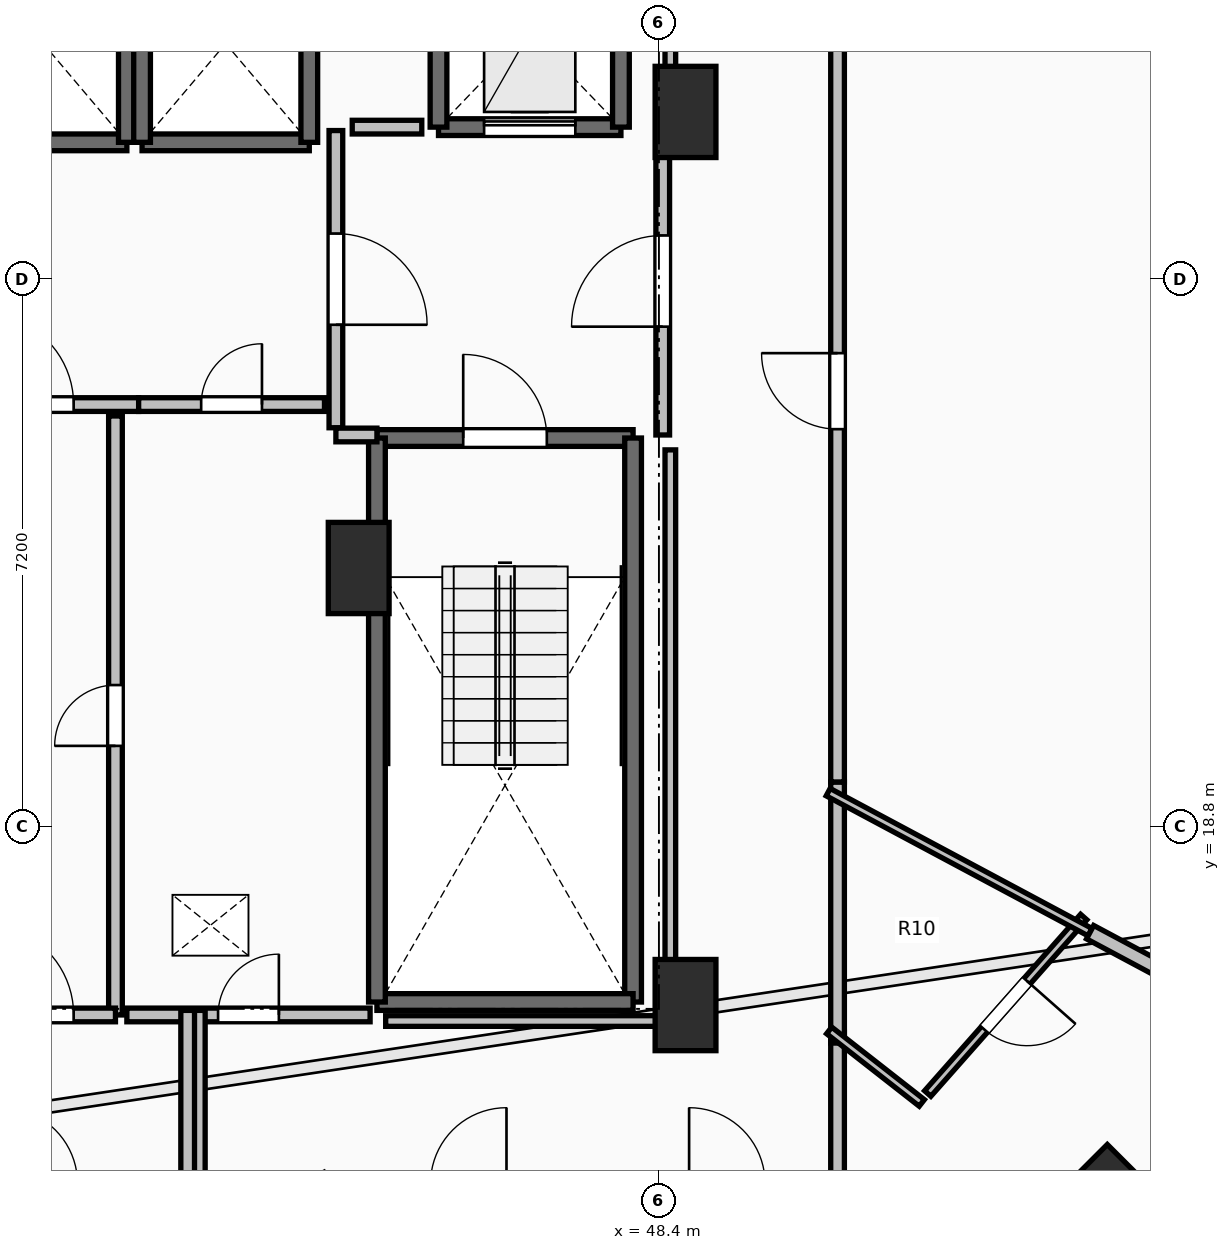
"""IFC4 building model, lengths in metres.
Left out: names, types, materials, properties, quantities, classifications, styles, units other than length and angle.
Written with IfcOpenShell. Run it as: python <this file> out.ifc"""

import sys

from ifc_helpers import new_model, si_unit, direction, frame, frame_2d, origin, origin_2d, place, context, subcontext, project, spatial, rectangle, extrude, element, fill, save


model = new_model("IFC4")
c1 = context("Model", 3, precision=1e-05, world=origin(), true_north=direction((0.0, 1.0)))
c2 = subcontext(c1, "Body", "Model", "MODEL_VIEW")
j1 = project(units=[si_unit("LENGTHUNIT", "METRE"), si_unit("PLANEANGLEUNIT", "RADIAN")], contexts=[c1])
p1 = place(None, origin())
s1 = spatial("IfcSite", under=j1, at=p1, CompositionType="ELEMENT")
p2 = place(p1, origin())
s2 = spatial("IfcBuilding", under=s1, at=p2, CompositionType="ELEMENT")
p3 = place(p2, frame((0.0, 0.0, 113.8)))
s3 = spatial("IfcBuildingStorey", under=s2, at=p3, CompositionType="ELEMENT", Elevation=113.8)
p4 = place(p3, frame((54.299, 13.838, 0.0), z_axis=(0.0, 0.0, 1.0), x_axis=(0.707106781187, -0.707106781187, 0.0)))
e1 = element("IfcColumn", 1, at=p4, inside=s3, PredefinedType="COLUMN", context=c2, shape_type="SweptSolid", body=[
    extrude(rectangle(XDim=1.1, YDim=1.1, at=origin_2d()), origin(), (0.0, 0.0, 1.0), 3.5),
])
for number, where, z_axis, x_axis in (
    (2, (48.75, 28.2, 0.0), (0.0, 0.0, 1.0), (1.0, 0.0, 0.0)),
    (3, (48.75, 16.45, 0.0), (0.0, 0.0, 1.0), (1.0, 0.0, 0.0)),
    (4, (44.45, 22.2, 0.0), (0.0, 0.0, 1.0), (1.0, 0.0, 0.0)),
):
    element("IfcColumn", number, at=place(p3, frame(where, z_axis=z_axis, x_axis=x_axis)), inside=s3, PredefinedType="PILASTER", context=c2, shape_type="SweptSolid", body=[
        extrude(rectangle(XDim=0.8, YDim=1.2, at=origin_2d()), origin(), (0.0, 0.0, 1.0), 3.5),
    ])
p5 = place(p3, frame((44.69, 23.91, 0.0), z_axis=(0.0, 0.0, 1.0), x_axis=(1.0, 0.0, 0.0)))
e5 = element("IfcWall", 5, at=p5, inside=s3, PredefinedType="SOLIDWALL", context=c2, shape_type="SweptSolid", body=[
    extrude(rectangle(XDim=3.37, YDim=0.22, at=frame_2d((1.685, 0.0))), origin(), (0.0, 0.0, 1.0), 3.24),
])
p6 = place(p5, frame((1.135, 0.0, 0.0)))
e6 = element("IfcOpeningElement", 6, at=p6, cuts=e5, PredefinedType="OPENING", context=c2, shape_type="SweptSolid", body=[
    extrude(rectangle(XDim=1.1, YDim=2.15, at=frame_2d((0.55, 1.075))), frame((0.0, 0.125, 0.0), z_axis=(0.0, -1.0, 0.0), x_axis=(1.0, 0.0, 0.0)), (0.0, 0.0, 1.0), 0.25),
])
p7 = place(p3, frame((48.06, 23.91, 0.0), z_axis=(0.0, 0.0, 1.0), x_axis=(0.0, -1.0, 0.0)))
e7 = element("IfcWall", 7, at=p7, inside=s3, PredefinedType="SOLIDWALL", context=c2, shape_type="SweptSolid", body=[
    extrude(rectangle(XDim=7.42, YDim=0.22, at=frame_2d((3.71, 0.0))), origin(), (0.0, 0.0, 1.0), 3.24),
])
p8 = place(p3, frame((48.06, 16.49, 0.0), z_axis=(0.0, 0.0, 1.0), x_axis=(-1.0, 0.0, 0.0)))
e8 = element("IfcWall", 8, at=p8, inside=s3, PredefinedType="SOLIDWALL", context=c2, shape_type="SweptSolid", body=[
    extrude(rectangle(XDim=3.37, YDim=0.22, at=frame_2d((1.685, 0.0))), origin(), (0.0, 0.0, 1.0), 3.24),
])
p9 = place(p3, frame((44.69, 16.49, 0.0), z_axis=(0.0, 0.0, 1.0), x_axis=(0.0, 1.0, 0.0)))
e9 = element("IfcWall", 9, at=p9, inside=s3, PredefinedType="SOLIDWALL", context=c2, shape_type="SweptSolid", body=[
    extrude(rectangle(XDim=7.42, YDim=0.22, at=frame_2d((3.71, 0.0))), origin(), (0.0, 0.0, 1.0), 3.24),
])
p10 = place(p3, frame((39.2, 27.8, 0.0), z_axis=(0.0, 0.0, 1.0), x_axis=(1.0, 0.0, 0.0)))
e10 = element("IfcWall", 10, at=p10, inside=s3, PredefinedType="SOLIDWALL", context=c2, shape_type="SweptSolid", body=[
    extrude(rectangle(XDim=2.2, YDim=0.22, at=frame_2d((1.1, 0.0))), origin(), (0.0, 0.0, 1.0), 3.24),
])
p11 = place(p3, frame((41.4, 27.8, 0.0), z_axis=(0.0, 0.0, 1.0), x_axis=(0.0, 1.0, 0.0)))
e11 = element("IfcWall", 11, at=p11, inside=s3, PredefinedType="SOLIDWALL", context=c2, shape_type="SweptSolid", body=[
    extrude(rectangle(XDim=2.6, YDim=0.22, at=frame_2d((1.3, 0.0))), origin(), (0.0, 0.0, 1.0), 3.24),
])
p12 = place(p3, frame((41.6, 27.8, 0.0), z_axis=(0.0, 0.0, 1.0), x_axis=(1.0, 0.0, 0.0)))
e12 = element("IfcWall", 12, at=p12, inside=s3, PredefinedType="SOLIDWALL", context=c2, shape_type="SweptSolid", body=[
    extrude(rectangle(XDim=2.2, YDim=0.22, at=frame_2d((1.1, 0.0))), origin(), (0.0, 0.0, 1.0), 3.24),
])
for number, where, z_axis, x_axis in (
    (13, (43.8, 27.8, 0.0), (0.0, 0.0, 1.0), (0.0, 1.0, 0.0)),
    (14, (41.6, 30.4, 0.0), (0.0, 0.0, 1.0), (0.0, -1.0, 0.0)),
):
    element("IfcWall", number, at=place(p3, frame(where, z_axis=z_axis, x_axis=x_axis)), inside=s3, PredefinedType="SOLIDWALL", context=c2, shape_type="SweptSolid", body=[
        extrude(rectangle(XDim=2.6, YDim=0.22, at=frame_2d((1.3, 0.0))), origin(), (0.0, 0.0, 1.0), 3.24),
    ])
p13 = place(p3, frame((45.5, 28.0, 0.0), z_axis=(0.0, 0.0, 1.0), x_axis=(1.0, 0.0, 0.0)))
e15 = element("IfcWall", 15, at=p13, inside=s3, PredefinedType="SHEAR", context=c2, shape_type="SweptSolid", body=[
    extrude(rectangle(XDim=2.4, YDim=0.22, at=frame_2d((1.2, 0.0))), origin(), (0.0, 0.0, 1.0), 3.24),
])
p14 = place(p13, frame((0.6, 0.0, 0.0)))
e16 = element("IfcOpeningElement", 16, at=p14, cuts=e15, PredefinedType="OPENING", context=c2, shape_type="SweptSolid", body=[
    extrude(rectangle(XDim=1.2, YDim=2.2, at=frame_2d((0.6, 1.1))), frame((0.0, 0.125, 0.0), z_axis=(0.0, -1.0, 0.0), x_axis=(1.0, 0.0, 0.0)), (0.0, 0.0, 1.0), 0.25),
])
for number, where, z_axis, x_axis in (
    (17, (47.9, 28.0, 0.0), (0.0, 0.0, 1.0), (0.0, 1.0, 0.0)),
    (18, (45.5, 30.5, 0.0), (0.0, 0.0, 1.0), (0.0, -1.0, 0.0)),
):
    element("IfcWall", number, at=place(p3, frame(where, z_axis=z_axis, x_axis=x_axis)), inside=s3, PredefinedType="SHEAR", context=c2, shape_type="SweptSolid", body=[
        extrude(rectangle(XDim=2.5, YDim=0.22, at=frame_2d((1.25, 0.0))), origin(), (0.0, 0.0, 1.0), 3.24),
    ])
p15 = place(p3, frame((44.15, 27.955, 0.0), z_axis=(0.0, 0.0, 1.0), x_axis=(0.0, -1.0, 0.0)))
e19 = element("IfcWall", 19, at=p15, inside=s3, PredefinedType="PARTITIONING", context=c2, shape_type="SweptSolid", body=[
    extrude(rectangle(XDim=3.91, YDim=0.18, at=frame_2d((1.955, 0.0))), origin(), (0.0, 0.0, 1.0), 3.24),
])
p16 = place(p15, frame((1.355, 0.0, 0.0)))
e20 = element("IfcOpeningElement", 20, at=p16, cuts=e19, PredefinedType="OPENING", context=c2, shape_type="SweptSolid", body=[
    extrude(rectangle(XDim=1.2, YDim=2.15, at=frame_2d((0.6, 1.075))), frame((0.0, 0.105, 0.0), z_axis=(0.0, -1.0, 0.0), x_axis=(1.0, 0.0, 0.0)), (0.0, 0.0, 1.0), 0.21),
])
p17 = place(p3, frame((44.15, 23.95, 0.0), z_axis=(0.0, 0.0, 1.0), x_axis=(1.0, 0.0, 0.0)))
e21 = element("IfcWall", 21, at=p17, inside=s3, PredefinedType="PARTITIONING", context=c2, shape_type="SweptSolid", body=[
    extrude(rectangle(XDim=0.54, YDim=0.18, at=frame_2d((0.27, 0.0))), origin(), (0.0, 0.0, 1.0), 3.24),
])
p18 = place(p3, frame((48.45, 23.95, 0.0), z_axis=(0.0, 0.0, 1.0), x_axis=(0.0, 1.0, 0.0)))
e22 = element("IfcWall", 22, at=p18, inside=s3, PredefinedType="PARTITIONING", context=c2, shape_type="SweptSolid", body=[
    extrude(rectangle(XDim=4.05, YDim=0.18, at=frame_2d((2.025, 0.0))), origin(), (0.0, 0.0, 1.0), 3.24),
])
p19 = place(p18, frame((1.425, 0.0, 0.0)))
e23 = element("IfcOpeningElement", 23, at=p19, cuts=e22, PredefinedType="OPENING", context=c2, shape_type="SweptSolid", body=[
    extrude(rectangle(XDim=1.2, YDim=2.15, at=frame_2d((0.6, 1.075))), frame((0.0, 0.105, 0.0), z_axis=(0.0, -1.0, 0.0), x_axis=(1.0, 0.0, 0.0)), (0.0, 0.0, 1.0), 0.21),
])
p20 = place(p3, frame((38.645, 24.35, 0.0), z_axis=(0.0, 0.0, 1.0), x_axis=(1.0, 0.0, 0.0)))
e24 = element("IfcWall", 24, at=p20, inside=s3, PredefinedType="PARTITIONING", context=c2, shape_type="SweptSolid", body=[
    extrude(rectangle(XDim=2.91, YDim=0.18, at=frame_2d((1.455, 0.0))), origin(), (0.0, 0.0, 1.0), 3.24),
])
p21 = place(p20, frame((0.855, 0.0, 0.0)))
e25 = element("IfcOpeningElement", 25, at=p21, cuts=e24, PredefinedType="OPENING", context=c2, shape_type="SweptSolid", body=[
    extrude(rectangle(XDim=1.2, YDim=2.15, at=frame_2d((0.6, 1.075))), frame((0.0, 0.105, 0.0), z_axis=(0.0, -1.0, 0.0), x_axis=(1.0, 0.0, 0.0)), (0.0, 0.0, 1.0), 0.21),
])
p22 = place(p3, frame((41.555, 24.35, 0.0), z_axis=(0.0, 0.0, 1.0), x_axis=(1.0, 0.0, 0.0)))
e26 = element("IfcWall", 26, at=p22, inside=s3, PredefinedType="PARTITIONING", context=c2, shape_type="SweptSolid", body=[
    extrude(rectangle(XDim=2.445, YDim=0.18, at=frame_2d((1.223, 0.0))), origin(), (0.0, 0.0, 1.0), 3.24),
])
p23 = place(p22, frame((0.823, 0.0, 0.0)))
e27 = element("IfcOpeningElement", 27, at=p23, cuts=e26, PredefinedType="OPENING", context=c2, shape_type="SweptSolid", body=[
    extrude(rectangle(XDim=0.8, YDim=2.05, at=frame_2d((0.4, 1.025))), frame((0.0, 0.105, 0.0), z_axis=(0.0, -1.0, 0.0), x_axis=(1.0, 0.0, 0.0)), (0.0, 0.0, 1.0), 0.21),
])
p24 = place(p3, frame((41.25, 16.32, 0.0), z_axis=(0.0, 0.0, 1.0), x_axis=(0.0, 1.0, 0.0)))
e28 = element("IfcWall", 28, at=p24, inside=s3, PredefinedType="PARTITIONING", context=c2, shape_type="SweptSolid", body=[
    extrude(rectangle(XDim=7.88, YDim=0.18, at=frame_2d((3.94, 0.0))), origin(), (0.0, 0.0, 1.0), 3.24),
])
p25 = place(p24, frame((3.54, 0.0, 0.0)))
e29 = element("IfcOpeningElement", 29, at=p25, cuts=e28, PredefinedType="OPENING", context=c2, shape_type="SweptSolid", body=[
    extrude(rectangle(XDim=0.8, YDim=2.05, at=frame_2d((0.4, 1.025))), frame((0.0, 0.105, 0.0), z_axis=(0.0, -1.0, 0.0), x_axis=(1.0, 0.0, 0.0)), (0.0, 0.0, 1.0), 0.21),
])
p26 = place(p3, frame((38.95, 16.32, 0.0), z_axis=(0.0, 0.0, 1.0), x_axis=(1.0, 0.0, 0.0)))
e30 = element("IfcWall", 30, at=p26, inside=s3, PredefinedType="PARTITIONING", context=c2, shape_type="SweptSolid", body=[
    extrude(rectangle(XDim=2.3, YDim=0.18, at=frame_2d((1.15, 0.0))), origin(), (0.0, 0.0, 1.0), 3.24),
])
p27 = place(p26, frame((0.55, 0.0, 0.0)))
e31 = element("IfcOpeningElement", 31, at=p27, cuts=e30, PredefinedType="OPENING", context=c2, shape_type="SweptSolid", body=[
    extrude(rectangle(XDim=1.2, YDim=2.15, at=frame_2d((0.6, 1.075))), frame((0.0, 0.105, 0.0), z_axis=(0.0, -1.0, 0.0), x_axis=(1.0, 0.0, 0.0)), (0.0, 0.0, 1.0), 0.21),
])
p28 = place(p3, frame((41.4, 16.32, 0.0), z_axis=(0.0, 0.0, 1.0), x_axis=(1.0, 0.0, 0.0)))
e32 = element("IfcWall", 32, at=p28, inside=s3, PredefinedType="PARTITIONING", context=c2, shape_type="SweptSolid", body=[
    extrude(rectangle(XDim=3.2, YDim=0.18, at=frame_2d((1.6, 0.0))), origin(), (0.0, 0.0, 1.0), 3.24),
])
p29 = place(p28, frame((1.2, 0.0, 0.0)))
e33 = element("IfcOpeningElement", 33, at=p29, cuts=e32, PredefinedType="OPENING", context=c2, shape_type="SweptSolid", body=[
    extrude(rectangle(XDim=0.8, YDim=2.05, at=frame_2d((0.4, 1.025))), frame((0.0, 0.105, 0.0), z_axis=(0.0, -1.0, 0.0), x_axis=(1.0, 0.0, 0.0)), (0.0, 0.0, 1.0), 0.21),
])
for number, where, z_axis, x_axis in (
    (34, (42.34, 16.38, 0.0), (0.0, 0.0, 1.0), (0.0, -1.0, 0.0)),
    (35, (42.2, 13.96, 0.0), (0.0, 0.0, 1.0), (0.0, 1.0, 0.0)),
):
    element("IfcWall", number, at=place(p3, frame(where, z_axis=z_axis, x_axis=x_axis)), inside=s3, PredefinedType="PARTITIONING", context=c2, shape_type="SweptSolid", body=[
        extrude(rectangle(XDim=2.42, YDim=0.18, at=frame_2d((1.21, 0.0))), origin(), (0.0, 0.0, 1.0), 2.929),
    ])
p30 = place(p3, frame((50.75, 14.1, 0.0), z_axis=(0.0, 0.0, 1.0), x_axis=(0.0, 1.0, 0.0)))
e36 = element("IfcWall", 36, at=p30, inside=s3, PredefinedType="PARTITIONING", context=c2, shape_type="SweptSolid", body=[
    extrude(rectangle(XDim=1.99, YDim=0.18, at=frame_2d((0.995, 0.0))), origin(), (0.0, 0.0, 1.0), 2.432),
])
p31 = place(p3, frame((50.75, 15.95, 0.0), z_axis=(0.0, 0.0, 1.0), x_axis=(0.0, 1.0, 0.0)))
e37 = element("IfcWall", 37, at=p31, inside=s3, PredefinedType="PARTITIONING", context=c2, shape_type="SweptSolid", body=[
    extrude(rectangle(XDim=3.435, YDim=0.18, at=frame_2d((1.718, 0.0))), origin(), (0.0, 0.0, 1.0), 2.929),
])
p32 = place(p3, frame((50.75, 19.385, 0.0), z_axis=(0.0, 0.0, 1.0), x_axis=(0.0, 1.0, 0.0)))
e38 = element("IfcWall", 38, at=p32, inside=s3, PredefinedType="PARTITIONING", context=c2, shape_type="SweptSolid", body=[
    extrude(rectangle(XDim=10.283, YDim=0.18, at=frame_2d((5.142, 0.0))), origin(), (0.0, 0.0, 1.0), 2.432),
])
p33 = place(p32, frame((4.642, 0.0, 0.0)))
e39 = element("IfcOpeningElement", 39, at=p33, cuts=e38, PredefinedType="OPENING", context=c2, shape_type="SweptSolid", body=[
    extrude(rectangle(XDim=1.0, YDim=2.15, at=frame_2d((0.5, 1.075))), frame((0.0, 0.105, 0.0), z_axis=(0.0, -1.0, 0.0), x_axis=(1.0, 0.0, 0.0)), (0.0, 0.0, 1.0), 0.21),
])
p34 = place(p3, frame((53.989, 17.608, 0.0), z_axis=(0.0, 0.0, 1.0), x_axis=(-0.662322264705, -0.749219071885, 0.0)))
e40 = element("IfcWall", 40, at=p34, inside=s3, PredefinedType="PARTITIONING", context=c2, shape_type="SweptSolid", body=[
    extrude(rectangle(XDim=3.099, YDim=0.11, at=frame_2d((1.549, 0.0))), origin(), (0.0, 0.0, 1.0), 2.886),
])
p35 = place(p34, frame((1.125, 0.0, 0.0)))
e41 = element("IfcOpeningElement", 41, at=p35, cuts=e40, PredefinedType="OPENING", context=c2, shape_type="SweptSolid", body=[
    extrude(rectangle(XDim=0.85, YDim=2.1, at=frame_2d((0.425, 1.05))), frame((0.0, 0.07, 0.0), z_axis=(0.0, -1.0, 0.0), x_axis=(1.0, 0.0, 0.0)), (0.0, 0.0, 1.0), 0.14),
])
p36 = place(p3, frame((51.858, 15.163, 0.0), z_axis=(0.0, 0.0, 1.0), x_axis=(-0.787564922247, 0.61623168796, 0.0)))
e42 = element("IfcWall", 42, at=p36, inside=s3, PredefinedType="PARTITIONING", context=c2, shape_type="SweptSolid", body=[
    extrude(rectangle(XDim=1.548, YDim=0.11, at=frame_2d((0.774, 0.0))), origin(), (0.0, 0.0, 1.0), 2.432),
])
p37 = place(p3, frame((54.073, 17.409, 0.0), z_axis=(0.0, 0.0, 1.0), x_axis=(-0.881911515214, 0.47141497572, 0.0)))
e43 = element("IfcWall", 43, at=p37, inside=s3, PredefinedType="PARTITIONING", context=c2, shape_type="SweptSolid", body=[
    extrude(rectangle(XDim=3.907, YDim=0.11, at=frame_2d((1.954, 0.0))), origin(), (0.0, 0.0, 1.0), 2.886),
])
p38 = place(p3, frame((59.384, 14.57, 0.0), z_axis=(0.0, 0.0, 1.0), x_axis=(-0.881918302895, 0.471402277274, 0.0)))
e44 = element("IfcWall", 44, at=p38, inside=s3, PredefinedType="PARTITIONING", context=c2, shape_type="SweptSolid", body=[
    extrude(rectangle(XDim=6.023, YDim=0.2, at=frame_2d((3.011, 0.0))), origin(), (0.0, 0.0, 1.0), 2.677),
])
p39 = place(p3, frame((45.28, 28.0, 0.0), z_axis=(0.0, 0.0, 1.0), x_axis=(-1.0, 0.0, 0.0)))
e45 = element("IfcWall", 45, at=p39, inside=s3, PredefinedType="PARTITIONING", context=c2, shape_type="SweptSolid", body=[
    extrude(rectangle(XDim=0.915, YDim=0.18, at=frame_2d((0.458, 0.0))), origin(), (0.0, 0.0, 1.0), 3.24),
])
p40 = place(p3, frame((48.55, 33.45, 0.0), z_axis=(0.0, 0.0, 1.0), x_axis=(0.0, -1.0, 0.0)))
e46 = element("IfcWall", 46, at=p40, inside=s3, PredefinedType="PARTITIONING", context=c2, shape_type="SweptSolid", body=[
    extrude(rectangle(XDim=5.254, YDim=0.14, at=frame_2d((2.627, 0.0))), origin(), (0.0, 0.0, 1.0), 2.432),
])
p41 = place(p3, frame((48.55, 23.754, 0.0), z_axis=(0.0, 0.0, 1.0), x_axis=(0.0, -1.0, 0.0)))
e47 = element("IfcWall", 47, at=p41, inside=s3, PredefinedType="PARTITIONING", context=c2, shape_type="SweptSolid", body=[
    extrude(rectangle(XDim=7.514, YDim=0.14, at=frame_2d((3.757, 0.0))), origin(), (0.0, 0.0, 1.0), 2.432),
])
p42 = place(p3, frame((48.55, 16.24, 0.0), z_axis=(0.0, 0.0, 1.0), x_axis=(-1.0, 0.0, 0.0)))
e48 = element("IfcWall", 48, at=p42, inside=s3, PredefinedType="PARTITIONING", context=c2, shape_type="SweptSolid", body=[
    extrude(rectangle(XDim=3.745, YDim=0.14, at=frame_2d((1.873, 0.0))), origin(), (0.0, 0.0, 1.0), 2.432),
])
p43 = place(p6, origin())
e49 = element("IfcDoor", 49, at=p43, inside=s3, OperationType="SINGLE_SWING_LEFT", PredefinedType="DOOR", context=c2, shape_type="SweptSolid", body=[
    extrude(rectangle(XDim=1.1, YDim=2.15, at=frame_2d((0.55, 1.075))), frame((0.0, 0.025, 0.0), z_axis=(0.0, -1.0, 0.0), x_axis=(1.0, 0.0, 0.0)), (0.0, 0.0, 1.0), 0.05),
])
fill(e6, e49)
p44 = place(p14, origin())
e50 = element("IfcDoor", 50, at=p44, inside=s3, OperationType="SLIDING_TO_LEFT", PredefinedType="DOOR", context=c2, shape_type="SweptSolid", body=[
    extrude(rectangle(XDim=1.2, YDim=2.2, at=frame_2d((0.6, 1.1))), frame((0.0, 0.025, 0.0), z_axis=(0.0, -1.0, 0.0), x_axis=(1.0, 0.0, 0.0)), (0.0, 0.0, 1.0), 0.05),
])
fill(e16, e50)
p45 = place(p16, origin())
e51 = element("IfcDoor", 51, at=p45, inside=s3, OperationType="SINGLE_SWING_RIGHT", PredefinedType="DOOR", context=c2, shape_type="SweptSolid", body=[
    extrude(rectangle(XDim=1.2, YDim=2.15, at=frame_2d((0.6, 1.075))), frame((0.0, 0.025, 0.0), z_axis=(0.0, -1.0, 0.0), x_axis=(1.0, 0.0, 0.0)), (0.0, 0.0, 1.0), 0.05),
])
fill(e20, e51)
p46 = place(p19, origin())
e52 = element("IfcDoor", 52, at=p46, inside=s3, OperationType="SINGLE_SWING_LEFT", PredefinedType="DOOR", context=c2, shape_type="SweptSolid", body=[
    extrude(rectangle(XDim=1.2, YDim=2.15, at=frame_2d((0.6, 1.075))), frame((0.0, 0.025, 0.0), z_axis=(0.0, -1.0, 0.0), x_axis=(1.0, 0.0, 0.0)), (0.0, 0.0, 1.0), 0.05),
])
fill(e23, e52)
p47 = place(p21, origin())
e53 = element("IfcDoor", 53, at=p47, inside=s3, OperationType="SINGLE_SWING_LEFT", PredefinedType="DOOR", context=c2, shape_type="SweptSolid", body=[
    extrude(rectangle(XDim=1.2, YDim=2.15, at=frame_2d((0.6, 1.075))), frame((0.0, 0.025, 0.0), z_axis=(0.0, -1.0, 0.0), x_axis=(1.0, 0.0, 0.0)), (0.0, 0.0, 1.0), 0.05),
])
fill(e25, e53)
p48 = place(p23, origin())
e54 = element("IfcDoor", 54, at=p48, inside=s3, OperationType="SINGLE_SWING_RIGHT", PredefinedType="DOOR", context=c2, shape_type="SweptSolid", body=[
    extrude(rectangle(XDim=0.8, YDim=2.05, at=frame_2d((0.4, 1.025))), frame((0.0, 0.025, 0.0), z_axis=(0.0, -1.0, 0.0), x_axis=(1.0, 0.0, 0.0)), (0.0, 0.0, 1.0), 0.05),
])
fill(e27, e54)
p49 = place(p25, origin())
e55 = element("IfcDoor", 55, at=p49, inside=s3, OperationType="SINGLE_SWING_LEFT", PredefinedType="DOOR", context=c2, shape_type="SweptSolid", body=[
    extrude(rectangle(XDim=0.8, YDim=2.05, at=frame_2d((0.4, 1.025))), frame((0.0, 0.025, 0.0), z_axis=(0.0, -1.0, 0.0), x_axis=(1.0, 0.0, 0.0)), (0.0, 0.0, 1.0), 0.05),
])
fill(e29, e55)
p50 = place(p27, origin())
e56 = element("IfcDoor", 56, at=p50, inside=s3, OperationType="SINGLE_SWING_LEFT", PredefinedType="DOOR", context=c2, shape_type="SweptSolid", body=[
    extrude(rectangle(XDim=1.2, YDim=2.15, at=frame_2d((0.6, 1.075))), frame((0.0, 0.025, 0.0), z_axis=(0.0, -1.0, 0.0), x_axis=(1.0, 0.0, 0.0)), (0.0, 0.0, 1.0), 0.05),
])
fill(e31, e56)
p51 = place(p29, origin())
e57 = element("IfcDoor", 57, at=p51, inside=s3, OperationType="SINGLE_SWING_RIGHT", PredefinedType="DOOR", context=c2, shape_type="SweptSolid", body=[
    extrude(rectangle(XDim=0.8, YDim=2.05, at=frame_2d((0.4, 1.025))), frame((0.0, 0.025, 0.0), z_axis=(0.0, -1.0, 0.0), x_axis=(1.0, 0.0, 0.0)), (0.0, 0.0, 1.0), 0.05),
])
fill(e33, e57)
p52 = place(p33, origin())
e58 = element("IfcDoor", 58, at=p52, inside=s3, OperationType="SINGLE_SWING_RIGHT", PredefinedType="DOOR", context=c2, shape_type="SweptSolid", body=[
    extrude(rectangle(XDim=1.0, YDim=2.15, at=frame_2d((0.5, 1.075))), frame((0.0, 0.025, 0.0), z_axis=(0.0, -1.0, 0.0), x_axis=(1.0, 0.0, 0.0)), (0.0, 0.0, 1.0), 0.05),
])
fill(e39, e58)
p53 = place(p35, origin())
e59 = element("IfcDoor", 59, at=p53, inside=s3, OperationType="SINGLE_SWING_LEFT", PredefinedType="DOOR", context=c2, shape_type="SweptSolid", body=[
    extrude(rectangle(XDim=0.85, YDim=2.1, at=frame_2d((0.425, 1.05))), frame((0.0, 0.025, 0.0), z_axis=(0.0, -1.0, 0.0), x_axis=(1.0, 0.0, 0.0)), (0.0, 0.0, 1.0), 0.05),
])
fill(e41, e59)
save(model, sys.argv[1])
